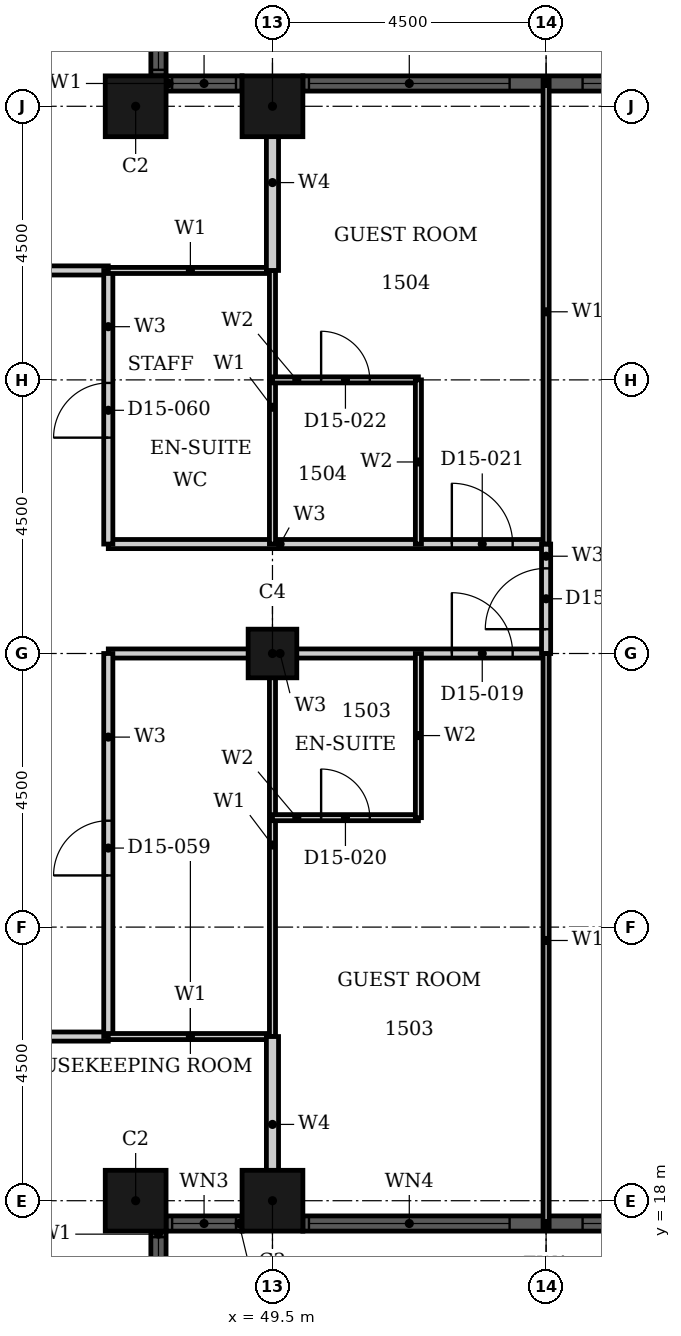
"""IFC4 building model, lengths in metres.
Left out: names, types, materials, properties, quantities, classifications, styles, units other than length and angle.
Written with IfcOpenShell. Run it as: python <this file> out.ifc"""

import sys

from ifc_helpers import new_model, si_unit, direction, frame, frame_2d, origin, origin_2d, place, context, subcontext, project, spatial, rectangle, hollow_rectangle, extrude, element, fill, save


model = new_model("IFC4")
c1 = context("Model", 3, precision=1e-05, world=origin(), true_north=direction((0.0, 1.0)))
c2 = subcontext(c1, "Body", "Model", "MODEL_VIEW")
j1 = project(units=[si_unit("LENGTHUNIT", "METRE"), si_unit("PLANEANGLEUNIT", "RADIAN")], contexts=[c1])
p1 = place(None, origin())
s1 = spatial("IfcSite", under=j1, at=p1, CompositionType="ELEMENT")
p2 = place(p1, origin())
s2 = spatial("IfcBuilding", under=s1, at=p2, CompositionType="ELEMENT")
p3 = place(p2, frame((0.0, 0.0, 67.2)))
s3 = spatial("IfcBuildingStorey", under=s2, at=p3, CompositionType="ELEMENT", Elevation=67.2)
for number, where, z_axis, x_axis in (
    (1, (47.25, 18.0, 0.0), (0.0, 0.0, 1.0), (1.0, 0.0, 0.0)),
    (2, (49.5, 18.0, 0.0), (0.0, 0.0, 1.0), (1.0, 0.0, 0.0)),
    (3, (49.5, 36.0, 0.0), (0.0, 0.0, 1.0), (1.0, 0.0, 0.0)),
    (4, (47.25, 36.0, 0.0), (0.0, 0.0, 1.0), (1.0, 0.0, 0.0)),
):
    element("IfcColumn", number, at=place(p3, frame(where, z_axis=z_axis, x_axis=x_axis)), inside=s3, PredefinedType="COLUMN", context=c2, shape_type="SweptSolid", body=[
        extrude(hollow_rectangle(XDim=1.0, YDim=1.0, WallThickness=0.032, at=origin_2d()), origin(), (0.0, 0.0, 1.0), 3.6),
    ])
p4 = place(p3, frame((49.5, 27.0, 0.0), z_axis=(0.0, 0.0, 1.0), x_axis=(1.0, 0.0, 0.0)))
e5 = element("IfcColumn", 5, at=p4, inside=s3, PredefinedType="COLUMN", context=c2, shape_type="SweptSolid", body=[
    extrude(hollow_rectangle(XDim=0.8, YDim=0.8, WallThickness=0.025, at=origin_2d()), origin(), (0.0, 0.0, 1.0), 3.6),
])
p5 = place(p3, frame((47.625, 16.25, 0.0), z_axis=(0.0, 0.0, 1.0), x_axis=(0.0, 1.0, 0.0)))
e6 = element("IfcWall", 6, at=p5, inside=s3, PredefinedType="SOLIDWALL", context=c2, shape_type="SweptSolid", body=[
    extrude(rectangle(XDim=1.25, YDim=0.25, at=frame_2d((0.625, 0.0))), origin(), (0.0, 0.0, 1.0), 3.6),
])
p6 = place(p5, frame((0.1, 0.0, 0.9)))
e7 = element("IfcOpeningElement", 7, at=p6, cuts=e6, PredefinedType="OPENING", context=c2, shape_type="SweptSolid", body=[
    extrude(rectangle(XDim=1.05, YDim=2.08, at=frame_2d((0.525, 1.04))), frame((0.0, 0.135, 0.0), z_axis=(0.0, -1.0, 0.0), x_axis=(1.0, 0.0, 0.0)), (0.0, 0.0, 1.0), 0.27),
])
p7 = place(p3, frame((47.75, 17.625, 0.0), z_axis=(0.0, 0.0, 1.0), x_axis=(1.0, 0.0, 0.0)))
e8 = element("IfcWall", 8, at=p7, inside=s3, PredefinedType="SOLIDWALL", context=c2, shape_type="SweptSolid", body=[
    extrude(rectangle(XDim=1.25, YDim=0.25, at=frame_2d((0.625, 0.0))), origin(), (0.0, 0.0, 1.0), 3.6),
])
p8 = place(p7, frame((0.1, 0.0, 0.9)))
e9 = element("IfcOpeningElement", 9, at=p8, cuts=e8, PredefinedType="OPENING", context=c2, shape_type="SweptSolid", body=[
    extrude(rectangle(XDim=1.05, YDim=2.08, at=frame_2d((0.525, 1.04))), frame((0.0, 0.135, 0.0), z_axis=(0.0, -1.0, 0.0), x_axis=(1.0, 0.0, 0.0)), (0.0, 0.0, 1.0), 0.27),
])
p9 = place(p3, frame((50.0, 17.625, 0.0), z_axis=(0.0, 0.0, 1.0), x_axis=(1.0, 0.0, 0.0)))
e10 = element("IfcWall", 10, at=p9, inside=s3, PredefinedType="SOLIDWALL", context=c2, shape_type="SweptSolid", body=[
    extrude(rectangle(XDim=8.0, YDim=0.25, at=frame_2d((4.0, 0.0))), origin(), (0.0, 0.0, 1.0), 3.6),
])
p10 = place(p9, frame((0.1, 0.0, 0.9)))
e11 = element("IfcOpeningElement", 11, at=p10, cuts=e10, PredefinedType="OPENING", context=c2, shape_type="SweptSolid", body=[
    extrude(rectangle(XDim=3.3, YDim=2.08, at=frame_2d((1.65, 1.04))), frame((0.0, 0.135, 0.0), z_axis=(0.0, -1.0, 0.0), x_axis=(1.0, 0.0, 0.0)), (0.0, 0.0, 1.0), 0.27),
])
p11 = place(p9, frame((4.6, 0.0, 0.9)))
e12 = element("IfcOpeningElement", 12, at=p11, cuts=e10, PredefinedType="OPENING", context=c2, shape_type="SweptSolid", body=[
    extrude(rectangle(XDim=3.3, YDim=2.08, at=frame_2d((1.65, 1.04))), frame((0.0, 0.135, 0.0), z_axis=(0.0, -1.0, 0.0), x_axis=(1.0, 0.0, 0.0)), (0.0, 0.0, 1.0), 0.27),
])
p12 = place(p3, frame((58.0, 36.375, 0.0), z_axis=(0.0, 0.0, 1.0), x_axis=(-1.0, 0.0, 0.0)))
e13 = element("IfcWall", 13, at=p12, inside=s3, PredefinedType="SOLIDWALL", context=c2, shape_type="SweptSolid", body=[
    extrude(rectangle(XDim=8.0, YDim=0.25, at=frame_2d((4.0, 0.0))), origin(), (0.0, 0.0, 1.0), 3.6),
])
p13 = place(p12, frame((0.1, 0.0, 0.9)))
e14 = element("IfcOpeningElement", 14, at=p13, cuts=e13, PredefinedType="OPENING", context=c2, shape_type="SweptSolid", body=[
    extrude(rectangle(XDim=3.3, YDim=2.08, at=frame_2d((1.65, 1.04))), frame((0.0, 0.135, 0.0), z_axis=(0.0, -1.0, 0.0), x_axis=(1.0, 0.0, 0.0)), (0.0, 0.0, 1.0), 0.27),
])
p14 = place(p12, frame((4.6, 0.0, 0.9)))
e15 = element("IfcOpeningElement", 15, at=p14, cuts=e13, PredefinedType="OPENING", context=c2, shape_type="SweptSolid", body=[
    extrude(rectangle(XDim=3.3, YDim=2.08, at=frame_2d((1.65, 1.04))), frame((0.0, 0.135, 0.0), z_axis=(0.0, -1.0, 0.0), x_axis=(1.0, 0.0, 0.0)), (0.0, 0.0, 1.0), 0.27),
])
p15 = place(p3, frame((49.0, 36.375, 0.0), z_axis=(0.0, 0.0, 1.0), x_axis=(-1.0, 0.0, 0.0)))
e16 = element("IfcWall", 16, at=p15, inside=s3, PredefinedType="SOLIDWALL", context=c2, shape_type="SweptSolid", body=[
    extrude(rectangle(XDim=1.25, YDim=0.25, at=frame_2d((0.625, 0.0))), origin(), (0.0, 0.0, 1.0), 3.6),
])
p16 = place(p15, frame((0.1, 0.0, 0.9)))
e17 = element("IfcOpeningElement", 17, at=p16, cuts=e16, PredefinedType="OPENING", context=c2, shape_type="SweptSolid", body=[
    extrude(rectangle(XDim=1.05, YDim=2.08, at=frame_2d((0.525, 1.04))), frame((0.0, 0.135, 0.0), z_axis=(0.0, -1.0, 0.0), x_axis=(1.0, 0.0, 0.0)), (0.0, 0.0, 1.0), 0.27),
])
p17 = place(p3, frame((47.625, 36.5, 0.0), z_axis=(0.0, 0.0, 1.0), x_axis=(0.0, 1.0, 0.0)))
e18 = element("IfcWall", 18, at=p17, inside=s3, PredefinedType="SOLIDWALL", context=c2, shape_type="SweptSolid", body=[
    extrude(rectangle(XDim=1.25, YDim=0.25, at=frame_2d((0.625, 0.0))), origin(), (0.0, 0.0, 1.0), 3.6),
])
p18 = place(p17, frame((0.1, 0.0, 0.9)))
e19 = element("IfcOpeningElement", 19, at=p18, cuts=e18, PredefinedType="OPENING", context=c2, shape_type="SweptSolid", body=[
    extrude(rectangle(XDim=1.05, YDim=2.08, at=frame_2d((0.525, 1.04))), frame((0.0, 0.135, 0.0), z_axis=(0.0, -1.0, 0.0), x_axis=(1.0, 0.0, 0.0)), (0.0, 0.0, 1.0), 0.27),
])
p19 = place(p3, frame((31.5, 20.7, 0.0), z_axis=(0.0, 0.0, 1.0), x_axis=(1.0, 0.0, 0.0)))
e20 = element("IfcWall", 20, at=p19, inside=s3, PredefinedType="PARTITIONING", context=c2, shape_type="SweptSolid", body=[
    extrude(rectangle(XDim=15.3, YDim=0.15, at=frame_2d((7.65, 0.0))), origin(), (0.0, 0.0, 1.0), 3.3),
])
p20 = place(p19, frame((11.95, 0.0, 0.0)))
e21 = element("IfcOpeningElement", 21, at=p20, cuts=e20, PredefinedType="OPENING", context=c2, shape_type="SweptSolid", body=[
    extrude(rectangle(XDim=1.0, YDim=2.1, at=frame_2d((0.5, 1.05))), frame((0.0, 0.085, 0.0), z_axis=(0.0, -1.0, 0.0), x_axis=(1.0, 0.0, 0.0)), (0.0, 0.0, 1.0), 0.17),
])
p21 = place(p19, frame((4.05, 0.0, 0.0)))
e22 = element("IfcOpeningElement", 22, at=p21, cuts=e20, PredefinedType="OPENING", context=c2, shape_type="SweptSolid", body=[
    extrude(rectangle(XDim=0.9, YDim=2.1, at=frame_2d((0.45, 1.05))), frame((0.0, 0.085, 0.0), z_axis=(0.0, -1.0, 0.0), x_axis=(1.0, 0.0, 0.0)), (0.0, 0.0, 1.0), 0.17),
])
p22 = place(p3, frame((46.8, 27.0, 0.0), z_axis=(0.0, 0.0, 1.0), x_axis=(1.0, 0.0, 0.0)))
e23 = element("IfcWall", 23, at=p22, inside=s3, PredefinedType="PARTITIONING", context=c2, shape_type="SweptSolid", body=[
    extrude(rectangle(XDim=7.2, YDim=0.15, at=frame_2d((3.6, 0.0))), origin(), (0.0, 0.0, 1.0), 2.58),
])
p23 = place(p22, frame((5.65, 0.0, 0.0)))
e24 = element("IfcOpeningElement", 24, at=p23, cuts=e23, PredefinedType="OPENING", context=c2, shape_type="SweptSolid", body=[
    extrude(rectangle(XDim=1.0, YDim=2.1, at=frame_2d((0.5, 1.05))), frame((0.0, 0.085, 0.0), z_axis=(0.0, -1.0, 0.0), x_axis=(1.0, 0.0, 0.0)), (0.0, 0.0, 1.0), 0.17),
])
p24 = place(p3, frame((46.8, 28.8, 0.0), z_axis=(0.0, 0.0, 1.0), x_axis=(1.0, 0.0, 0.0)))
e25 = element("IfcWall", 25, at=p24, inside=s3, PredefinedType="PARTITIONING", context=c2, shape_type="SweptSolid", body=[
    extrude(rectangle(XDim=7.2, YDim=0.15, at=frame_2d((3.6, 0.0))), origin(), (0.0, 0.0, 1.0), 3.3),
])
p25 = place(p24, frame((5.65, 0.0, 0.0)))
e26 = element("IfcOpeningElement", 26, at=p25, cuts=e25, PredefinedType="OPENING", context=c2, shape_type="SweptSolid", body=[
    extrude(rectangle(XDim=1.0, YDim=2.1, at=frame_2d((0.5, 1.05))), frame((0.0, 0.085, 0.0), z_axis=(0.0, -1.0, 0.0), x_axis=(1.0, 0.0, 0.0)), (0.0, 0.0, 1.0), 0.17),
])
p26 = place(p3, frame((33.3, 33.3, 0.0), z_axis=(0.0, 0.0, 1.0), x_axis=(1.0, 0.0, 0.0)))
e27 = element("IfcWall", 27, at=p26, inside=s3, PredefinedType="PARTITIONING", context=c2, shape_type="SweptSolid", body=[
    extrude(rectangle(XDim=13.5, YDim=0.15, at=frame_2d((6.75, 0.0))), origin(), (0.0, 0.0, 1.0), 3.3),
])
p27 = place(p26, frame((10.15, 0.0, 0.0)))
e28 = element("IfcOpeningElement", 28, at=p27, cuts=e27, PredefinedType="OPENING", context=c2, shape_type="SweptSolid", body=[
    extrude(rectangle(XDim=1.0, YDim=2.1, at=frame_2d((0.5, 1.05))), frame((0.0, 0.085, 0.0), z_axis=(0.0, -1.0, 0.0), x_axis=(1.0, 0.0, 0.0)), (0.0, 0.0, 1.0), 0.17),
])
p28 = place(p26, frame((3.15, 0.0, 0.0)))
e29 = element("IfcOpeningElement", 29, at=p28, cuts=e27, PredefinedType="OPENING", context=c2, shape_type="SweptSolid", body=[
    extrude(rectangle(XDim=0.9, YDim=2.1, at=frame_2d((0.45, 1.05))), frame((0.0, 0.085, 0.0), z_axis=(0.0, -1.0, 0.0), x_axis=(1.0, 0.0, 0.0)), (0.0, 0.0, 1.0), 0.17),
])
p29 = place(p3, frame((46.8, 28.8, 0.0), z_axis=(0.0, 0.0, 1.0), x_axis=(0.0, 1.0, 0.0)))
e30 = element("IfcWall", 30, at=p29, inside=s3, PredefinedType="PARTITIONING", context=c2, shape_type="SweptSolid", body=[
    extrude(rectangle(XDim=4.5, YDim=0.15, at=frame_2d((2.25, 0.0))), origin(), (0.0, 0.0, 1.0), 3.3),
])
p30 = place(p29, frame((1.75, 0.0, 0.0)))
e31 = element("IfcOpeningElement", 31, at=p30, cuts=e30, PredefinedType="OPENING", context=c2, shape_type="SweptSolid", body=[
    extrude(rectangle(XDim=0.9, YDim=2.1, at=frame_2d((0.45, 1.05))), frame((0.0, 0.085, 0.0), z_axis=(0.0, -1.0, 0.0), x_axis=(1.0, 0.0, 0.0)), (0.0, 0.0, 1.0), 0.17),
])
p31 = place(p3, frame((46.8, 20.7, 0.0), z_axis=(0.0, 0.0, 1.0), x_axis=(0.0, 1.0, 0.0)))
e32 = element("IfcWall", 32, at=p31, inside=s3, PredefinedType="PARTITIONING", context=c2, shape_type="SweptSolid", body=[
    extrude(rectangle(XDim=6.3, YDim=0.15, at=frame_2d((3.15, 0.0))), origin(), (0.0, 0.0, 1.0), 3.3),
])
p32 = place(p31, frame((2.65, 0.0, 0.0)))
e33 = element("IfcOpeningElement", 33, at=p32, cuts=e32, PredefinedType="OPENING", context=c2, shape_type="SweptSolid", body=[
    extrude(rectangle(XDim=0.9, YDim=2.1, at=frame_2d((0.45, 1.05))), frame((0.0, 0.085, 0.0), z_axis=(0.0, -1.0, 0.0), x_axis=(1.0, 0.0, 0.0)), (0.0, 0.0, 1.0), 0.17),
])
p33 = place(p3, frame((54.0, 27.0, 0.0), z_axis=(0.0, 0.0, 1.0), x_axis=(0.0, 1.0, 0.0)))
e34 = element("IfcWall", 34, at=p33, inside=s3, PredefinedType="PARTITIONING", context=c2, shape_type="SweptSolid", body=[
    extrude(rectangle(XDim=1.8, YDim=0.15, at=frame_2d((0.9, 0.0))), origin(), (0.0, 0.0, 1.0), 3.3),
])
p34 = place(p33, frame((0.4, 0.0, 0.0)))
e35 = element("IfcOpeningElement", 35, at=p34, cuts=e34, PredefinedType="OPENING", context=c2, shape_type="SweptSolid", body=[
    extrude(rectangle(XDim=1.0, YDim=2.1, at=frame_2d((0.5, 1.05))), frame((0.0, 0.085, 0.0), z_axis=(0.0, -1.0, 0.0), x_axis=(1.0, 0.0, 0.0)), (0.0, 0.0, 1.0), 0.17),
])
for number, where, z_axis, x_axis in (
    (36, (46.8, 20.7, 0.0), (0.0, 0.0, 1.0), (1.0, 0.0, 0.0)),
    (37, (46.8, 33.3, 0.0), (0.0, 0.0, 1.0), (1.0, 0.0, 0.0)),
):
    element("IfcWall", number, at=place(p3, frame(where, z_axis=z_axis, x_axis=x_axis)), inside=s3, PredefinedType="PARTITIONING", context=c2, shape_type="SweptSolid", body=[
        extrude(rectangle(XDim=2.7, YDim=0.1, at=frame_2d((1.35, 0.0))), origin(), (0.0, 0.0, 1.0), 3.3),
    ])
p35 = place(p3, frame((49.5, 28.8, 0.0), z_axis=(0.0, 0.0, 1.0), x_axis=(0.0, 1.0, 0.0)))
e38 = element("IfcWall", 38, at=p35, inside=s3, PredefinedType="PARTITIONING", context=c2, shape_type="SweptSolid", body=[
    extrude(rectangle(XDim=4.5, YDim=0.1, at=frame_2d((2.25, 0.0))), origin(), (0.0, 0.0, 1.0), 2.38),
])
p36 = place(p3, frame((49.5, 20.7, 0.0), z_axis=(0.0, 0.0, 1.0), x_axis=(0.0, 1.0, 0.0)))
e39 = element("IfcWall", 39, at=p36, inside=s3, PredefinedType="PARTITIONING", context=c2, shape_type="SweptSolid", body=[
    extrude(rectangle(XDim=6.3, YDim=0.1, at=frame_2d((3.15, 0.0))), origin(), (0.0, 0.0, 1.0), 2.38),
])
p37 = place(p3, frame((54.0, 28.8, 0.0), z_axis=(0.0, 0.0, 1.0), x_axis=(0.0, 1.0, 0.0)))
e40 = element("IfcWall", 40, at=p37, inside=s3, PredefinedType="PARTITIONING", context=c2, shape_type="SweptSolid", body=[
    extrude(rectangle(XDim=7.64, YDim=0.1, at=frame_2d((3.82, 0.0))), origin(), (0.0, 0.0, 1.0), 3.3),
])
p38 = place(p3, frame((54.0, 17.56, 0.0), z_axis=(0.0, 0.0, 1.0), x_axis=(0.0, 1.0, 0.0)))
e41 = element("IfcWall", 41, at=p38, inside=s3, PredefinedType="PARTITIONING", context=c2, shape_type="SweptSolid", body=[
    extrude(rectangle(XDim=9.44, YDim=0.1, at=frame_2d((4.72, 0.0))), origin(), (0.0, 0.0, 1.0), 3.3),
])
for number, where, z_axis, x_axis in (
    (42, (49.5, 33.3, 0.0), (0.0, 0.0, 1.0), (0.0, 1.0, 0.0)),
    (43, (49.5, 17.81, 0.0), (0.0, 0.0, 1.0), (0.0, 1.0, 0.0)),
):
    element("IfcWall", number, at=place(p3, frame(where, z_axis=z_axis, x_axis=x_axis)), inside=s3, PredefinedType="PARTITIONING", context=c2, shape_type="SweptSolid", body=[
        extrude(rectangle(XDim=2.89, YDim=0.2, at=frame_2d((1.445, 0.0))), origin(), (0.0, 0.0, 1.0), 2.38),
    ])
p39 = place(p3, frame((49.5, 24.3, 0.0), z_axis=(0.0, 0.0, 1.0), x_axis=(1.0, 0.0, 0.0)))
e44 = element("IfcWall", 44, at=p39, inside=s3, PredefinedType="PARTITIONING", context=c2, shape_type="SweptSolid", body=[
    extrude(rectangle(XDim=2.4, YDim=0.1, at=frame_2d((1.2, 0.0))), origin(), (0.0, 0.0, 1.0), 3.3),
])
p40 = place(p39, frame((0.8, 0.0, 0.0)))
e45 = element("IfcOpeningElement", 45, at=p40, cuts=e44, PredefinedType="OPENING", context=c2, shape_type="SweptSolid", body=[
    extrude(rectangle(XDim=0.8, YDim=2.1, at=frame_2d((0.4, 1.05))), frame((0.0, 0.06, 0.0), z_axis=(0.0, -1.0, 0.0), x_axis=(1.0, 0.0, 0.0)), (0.0, 0.0, 1.0), 0.12),
])
p41 = place(p3, frame((49.5, 31.5, 0.0), z_axis=(0.0, 0.0, 1.0), x_axis=(1.0, 0.0, 0.0)))
e46 = element("IfcWall", 46, at=p41, inside=s3, PredefinedType="PARTITIONING", context=c2, shape_type="SweptSolid", body=[
    extrude(rectangle(XDim=2.4, YDim=0.1, at=frame_2d((1.2, 0.0))), origin(), (0.0, 0.0, 1.0), 2.58),
])
p42 = place(p41, frame((0.8, 0.0, 0.0)))
e47 = element("IfcOpeningElement", 47, at=p42, cuts=e46, PredefinedType="OPENING", context=c2, shape_type="SweptSolid", body=[
    extrude(rectangle(XDim=0.8, YDim=2.1, at=frame_2d((0.4, 1.05))), frame((0.0, 0.06, 0.0), z_axis=(0.0, -1.0, 0.0), x_axis=(1.0, 0.0, 0.0)), (0.0, 0.0, 1.0), 0.12),
])
for number, where, z_axis, x_axis in (
    (48, (51.9, 28.8, 0.0), (0.0, 0.0, 1.0), (0.0, 1.0, 0.0)),
    (49, (51.9, 24.3, 0.0), (0.0, 0.0, 1.0), (0.0, 1.0, 0.0)),
):
    element("IfcWall", number, at=place(p3, frame(where, z_axis=z_axis, x_axis=x_axis)), inside=s3, PredefinedType="PARTITIONING", context=c2, shape_type="SweptSolid", body=[
        extrude(rectangle(XDim=2.7, YDim=0.1, at=frame_2d((1.35, 0.0))), origin(), (0.0, 0.0, 1.0), 3.3),
    ])
p43 = place(p6, origin())
e50 = element("IfcWindow", 50, at=p43, inside=s3, PartitioningType="SINGLE_PANEL", PredefinedType="WINDOW", context=c2, shape_type="SweptSolid", body=[
    extrude(rectangle(XDim=1.05, YDim=2.08, at=frame_2d((0.525, 1.04))), frame((0.0, 0.03, 0.0), z_axis=(0.0, -1.0, 0.0), x_axis=(1.0, 0.0, 0.0)), (0.0, 0.0, 1.0), 0.06),
])
fill(e7, e50)
p44 = place(p8, origin())
e51 = element("IfcWindow", 51, at=p44, inside=s3, PartitioningType="SINGLE_PANEL", PredefinedType="WINDOW", context=c2, shape_type="SweptSolid", body=[
    extrude(rectangle(XDim=1.05, YDim=2.08, at=frame_2d((0.525, 1.04))), frame((0.0, 0.03, 0.0), z_axis=(0.0, -1.0, 0.0), x_axis=(1.0, 0.0, 0.0)), (0.0, 0.0, 1.0), 0.06),
])
fill(e9, e51)
p45 = place(p10, origin())
e52 = element("IfcWindow", 52, at=p45, inside=s3, PartitioningType="SINGLE_PANEL", PredefinedType="WINDOW", context=c2, shape_type="SweptSolid", body=[
    extrude(rectangle(XDim=3.3, YDim=2.08, at=frame_2d((1.65, 1.04))), frame((0.0, 0.03, 0.0), z_axis=(0.0, -1.0, 0.0), x_axis=(1.0, 0.0, 0.0)), (0.0, 0.0, 1.0), 0.06),
])
fill(e11, e52)
p46 = place(p11, origin())
e53 = element("IfcWindow", 53, at=p46, inside=s3, PartitioningType="SINGLE_PANEL", PredefinedType="WINDOW", context=c2, shape_type="SweptSolid", body=[
    extrude(rectangle(XDim=3.3, YDim=2.08, at=frame_2d((1.65, 1.04))), frame((0.0, 0.03, 0.0), z_axis=(0.0, -1.0, 0.0), x_axis=(1.0, 0.0, 0.0)), (0.0, 0.0, 1.0), 0.06),
])
fill(e12, e53)
p47 = place(p13, origin())
e54 = element("IfcWindow", 54, at=p47, inside=s3, PartitioningType="SINGLE_PANEL", PredefinedType="WINDOW", context=c2, shape_type="SweptSolid", body=[
    extrude(rectangle(XDim=3.3, YDim=2.08, at=frame_2d((1.65, 1.04))), frame((0.0, 0.03, 0.0), z_axis=(0.0, -1.0, 0.0), x_axis=(1.0, 0.0, 0.0)), (0.0, 0.0, 1.0), 0.06),
])
fill(e14, e54)
p48 = place(p14, origin())
e55 = element("IfcWindow", 55, at=p48, inside=s3, PartitioningType="SINGLE_PANEL", PredefinedType="WINDOW", context=c2, shape_type="SweptSolid", body=[
    extrude(rectangle(XDim=3.3, YDim=2.08, at=frame_2d((1.65, 1.04))), frame((0.0, 0.03, 0.0), z_axis=(0.0, -1.0, 0.0), x_axis=(1.0, 0.0, 0.0)), (0.0, 0.0, 1.0), 0.06),
])
fill(e15, e55)
p49 = place(p16, origin())
e56 = element("IfcWindow", 56, at=p49, inside=s3, PartitioningType="SINGLE_PANEL", PredefinedType="WINDOW", context=c2, shape_type="SweptSolid", body=[
    extrude(rectangle(XDim=1.05, YDim=2.08, at=frame_2d((0.525, 1.04))), frame((0.0, 0.03, 0.0), z_axis=(0.0, -1.0, 0.0), x_axis=(1.0, 0.0, 0.0)), (0.0, 0.0, 1.0), 0.06),
])
fill(e17, e56)
p50 = place(p18, origin())
e57 = element("IfcWindow", 57, at=p50, inside=s3, PartitioningType="SINGLE_PANEL", PredefinedType="WINDOW", context=c2, shape_type="SweptSolid", body=[
    extrude(rectangle(XDim=1.05, YDim=2.08, at=frame_2d((0.525, 1.04))), frame((0.0, 0.03, 0.0), z_axis=(0.0, -1.0, 0.0), x_axis=(1.0, 0.0, 0.0)), (0.0, 0.0, 1.0), 0.06),
])
fill(e19, e57)
p51 = place(p23, origin())
e58 = element("IfcDoor", 58, at=p51, inside=s3, OperationType="SINGLE_SWING_RIGHT", PredefinedType="DOOR", context=c2, shape_type="SweptSolid", body=[
    extrude(rectangle(XDim=1.0, YDim=2.1, at=frame_2d((0.5, 1.05))), frame((0.0, 0.025, 0.0), z_axis=(0.0, -1.0, 0.0), x_axis=(1.0, 0.0, 0.0)), (0.0, 0.0, 1.0), 0.05),
])
fill(e24, e58)
p52 = place(p40, origin())
e59 = element("IfcDoor", 59, at=p52, inside=s3, OperationType="SINGLE_SWING_RIGHT", PredefinedType="DOOR", context=c2, shape_type="SweptSolid", body=[
    extrude(rectangle(XDim=0.8, YDim=2.1, at=frame_2d((0.4, 1.05))), frame((0.0, 0.025, 0.0), z_axis=(0.0, -1.0, 0.0), x_axis=(1.0, 0.0, 0.0)), (0.0, 0.0, 1.0), 0.05),
])
fill(e45, e59)
p53 = place(p25, origin())
e60 = element("IfcDoor", 60, at=p53, inside=s3, OperationType="SINGLE_SWING_RIGHT", PredefinedType="DOOR", context=c2, shape_type="SweptSolid", body=[
    extrude(rectangle(XDim=1.0, YDim=2.1, at=frame_2d((0.5, 1.05))), frame((0.0, 0.025, 0.0), z_axis=(0.0, -1.0, 0.0), x_axis=(1.0, 0.0, 0.0)), (0.0, 0.0, 1.0), 0.05),
])
fill(e26, e60)
p54 = place(p42, origin())
e61 = element("IfcDoor", 61, at=p54, inside=s3, OperationType="SINGLE_SWING_RIGHT", PredefinedType="DOOR", context=c2, shape_type="SweptSolid", body=[
    extrude(rectangle(XDim=0.8, YDim=2.1, at=frame_2d((0.4, 1.05))), frame((0.0, 0.025, 0.0), z_axis=(0.0, -1.0, 0.0), x_axis=(1.0, 0.0, 0.0)), (0.0, 0.0, 1.0), 0.05),
])
fill(e47, e61)
p55 = place(p34, origin())
e62 = element("IfcDoor", 62, at=p55, inside=s3, OperationType="SINGLE_SWING_RIGHT", PredefinedType="DOOR", context=c2, shape_type="SweptSolid", body=[
    extrude(rectangle(XDim=1.0, YDim=2.1, at=frame_2d((0.5, 1.05))), frame((0.0, 0.025, 0.0), z_axis=(0.0, -1.0, 0.0), x_axis=(1.0, 0.0, 0.0)), (0.0, 0.0, 1.0), 0.05),
])
fill(e35, e62)
p56 = place(p32, origin())
e63 = element("IfcDoor", 63, at=p56, inside=s3, OperationType="SINGLE_SWING_RIGHT", PredefinedType="DOOR", context=c2, shape_type="SweptSolid", body=[
    extrude(rectangle(XDim=0.9, YDim=2.1, at=frame_2d((0.45, 1.05))), frame((0.0, 0.025, 0.0), z_axis=(0.0, -1.0, 0.0), x_axis=(1.0, 0.0, 0.0)), (0.0, 0.0, 1.0), 0.05),
])
fill(e33, e63)
p57 = place(p30, origin())
e64 = element("IfcDoor", 64, at=p57, inside=s3, OperationType="SINGLE_SWING_LEFT", PredefinedType="DOOR", context=c2, shape_type="SweptSolid", body=[
    extrude(rectangle(XDim=0.9, YDim=2.1, at=frame_2d((0.45, 1.05))), frame((0.0, 0.025, 0.0), z_axis=(0.0, -1.0, 0.0), x_axis=(1.0, 0.0, 0.0)), (0.0, 0.0, 1.0), 0.05),
])
fill(e31, e64)
save(model, sys.argv[1])
